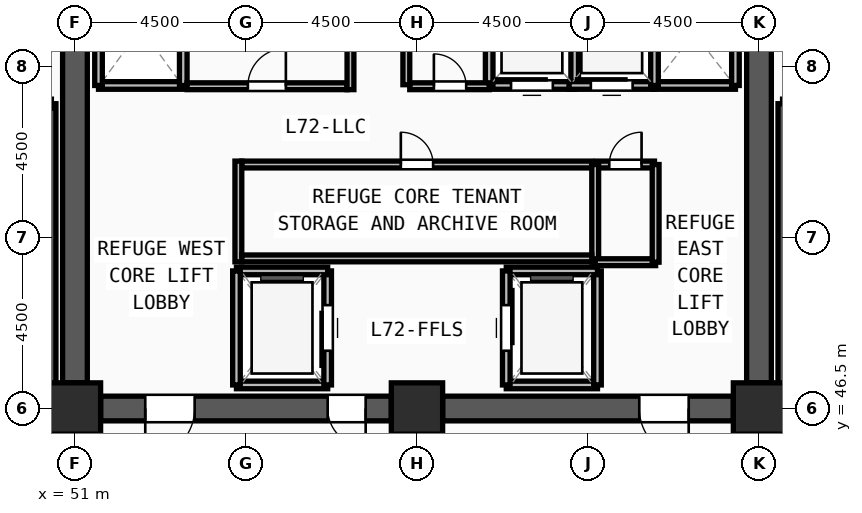
"""IFC4 building model, lengths in metres.
Left out: names, types, materials, properties, quantities, classifications, styles, units other than length and angle.
Written with IfcOpenShell. Run it as: python <this file> out.ifc"""

import sys

from ifc_helpers import new_model, si_unit, direction, frame, frame_2d, origin, origin_2d, place, context, subcontext, project, spatial, rectangle, extrude, source, transform, mapped, element, fill, save


model = new_model("IFC4")
c1 = context("Model", 3, precision=1e-05, world=origin(), true_north=direction((0.0, 1.0)))
c2 = subcontext(c1, "Body", "Model", "MODEL_VIEW")
j1 = project(units=[si_unit("LENGTHUNIT", "METRE"), si_unit("PLANEANGLEUNIT", "RADIAN")], contexts=[c1])
p1 = place(None, origin())
s1 = spatial("IfcSite", under=j1, at=p1, CompositionType="ELEMENT")
p2 = place(p1, origin())
s2 = spatial("IfcBuilding", under=s1, at=p2, CompositionType="ELEMENT")
p3 = place(p2, frame((0.0, 0.0, 277.5)))
s3 = spatial("IfcBuildingStorey", under=s2, at=p3, CompositionType="ELEMENT", Elevation=277.5)
m1 = source(origin(), c2, "Body", "SweptSolid", [
    extrude(rectangle(XDim=1.35, YDim=1.35, at=origin_2d()), origin(), (0.0, 0.0, 1.0), 4.5),
])
for number, where, z_axis, x_axis in (
    (1, (51.0, 46.5, 0.0), (0.0, 0.0, 1.0), (1.0, 0.0, 0.0)),
    (2, (60.0, 46.5, 0.0), (0.0, 0.0, 1.0), (1.0, 0.0, 0.0)),
    (3, (69.0, 46.5, 0.0), (0.0, 0.0, 1.0), (1.0, 0.0, 0.0)),
):
    element("IfcColumn", number, at=place(p3, frame(where, z_axis=z_axis, x_axis=x_axis)), inside=s3, PredefinedType="COLUMN", context=c2, shape_type="MappedRepresentation", body=[
        mapped(m1, transform((0.0, 0.0, 0.0), x_axis=(1.0, 0.0, 0.0), y_axis=(0.0, 1.0, 0.0), z_axis=(0.0, 0.0, 1.0), scale=1.0)),
    ])
p4 = place(p3, frame((69.0, 60.825, 0.0), z_axis=(0.0, 0.0, 1.0), x_axis=(0.0, -1.0, 0.0)))
e4 = element("IfcWall", 4, at=p4, inside=s3, PredefinedType="SHEAR", context=c2, shape_type="SweptSolid", body=[
    extrude(rectangle(XDim=13.65, YDim=0.65, at=frame_2d((6.825, 0.0))), origin(), (0.0, 0.0, 1.0), 4.22),
])
m2 = source(origin(), c2, "Body", "SweptSolid", [
    extrude(rectangle(XDim=1.2, YDim=2.2, at=frame_2d((0.6, 1.1))), frame((0.0, 0.335, 0.0), z_axis=(0.0, -1.0, 0.0), x_axis=(1.0, 0.0, 0.0)), (0.0, 0.0, 1.0), 0.67),
])
p5 = place(p4, frame((1.275, 0.0, 0.0)))
e5 = element("IfcOpeningElement", 5, at=p5, cuts=e4, PredefinedType="OPENING", context=c2, shape_type="MappedRepresentation", body=[
    mapped(m2, transform((0.0, 0.0, 0.0), x_axis=(1.0, 0.0, 0.0), y_axis=(0.0, 1.0, 0.0), z_axis=(0.0, 0.0, 1.0), scale=1.0)),
])
p6 = place(p3, frame((68.325, 46.5, 0.0), z_axis=(0.0, 0.0, 1.0), x_axis=(-1.0, 0.0, 0.0)))
e6 = element("IfcWall", 6, at=p6, inside=s3, PredefinedType="SHEAR", context=c2, shape_type="SweptSolid", body=[
    extrude(rectangle(XDim=7.65, YDim=0.65, at=frame_2d((3.825, 0.0))), origin(), (0.0, 0.0, 1.0), 4.22),
])
m3 = source(origin(), c2, "Body", "SweptSolid", [
    extrude(rectangle(XDim=1.3, YDim=2.2, at=frame_2d((0.65, 1.1))), frame((0.0, 0.335, 0.0), z_axis=(0.0, -1.0, 0.0), x_axis=(1.0, 0.0, 0.0)), (0.0, 0.0, 1.0), 0.67),
])
p7 = place(p6, frame((1.175, 0.0, 0.0)))
e7 = element("IfcOpeningElement", 7, at=p7, cuts=e6, PredefinedType="OPENING", context=c2, shape_type="MappedRepresentation", body=[
    mapped(m3, transform((0.0, 0.0, 0.0), x_axis=(1.0, 0.0, 0.0), y_axis=(0.0, 1.0, 0.0), z_axis=(0.0, 0.0, 1.0), scale=1.0)),
])
p8 = place(p3, frame((59.325, 46.5, 0.0), z_axis=(0.0, 0.0, 1.0), x_axis=(-1.0, 0.0, 0.0)))
e8 = element("IfcWall", 8, at=p8, inside=s3, PredefinedType="SHEAR", context=c2, shape_type="SweptSolid", body=[
    extrude(rectangle(XDim=7.65, YDim=0.65, at=frame_2d((3.825, 0.0))), origin(), (0.0, 0.0, 1.0), 4.22),
])
p9 = place(p8, frame((5.175, 0.0, 0.0)))
e9 = element("IfcOpeningElement", 9, at=p9, cuts=e8, PredefinedType="OPENING", context=c2, shape_type="MappedRepresentation", body=[
    mapped(m3, transform((0.0, 0.0, 0.0), x_axis=(1.0, 0.0, 0.0), y_axis=(0.0, 1.0, 0.0), z_axis=(0.0, 0.0, 1.0), scale=1.0)),
])
m4 = source(origin(), c2, "Body", "SweptSolid", [
    extrude(rectangle(XDim=1.0, YDim=2.2, at=frame_2d((0.5, 1.1))), frame((0.0, 0.335, 0.0), z_axis=(0.0, -1.0, 0.0), x_axis=(1.0, 0.0, 0.0)), (0.0, 0.0, 1.0), 0.67),
])
p10 = place(p8, frame((0.675, 0.0, 0.0)))
e10 = element("IfcOpeningElement", 10, at=p10, cuts=e8, PredefinedType="OPENING", context=c2, shape_type="MappedRepresentation", body=[
    mapped(m4, transform((0.0, 0.0, 0.0), x_axis=(1.0, 0.0, 0.0), y_axis=(0.0, 1.0, 0.0), z_axis=(0.0, 0.0, 1.0), scale=1.0)),
])
p11 = place(p3, frame((51.0, 47.175, 0.0), z_axis=(0.0, 0.0, 1.0), x_axis=(0.0, 1.0, 0.0)))
e11 = element("IfcWall", 11, at=p11, inside=s3, PredefinedType="SHEAR", context=c2, shape_type="SweptSolid", body=[
    extrude(rectangle(XDim=13.65, YDim=0.65, at=frame_2d((6.825, 0.0))), origin(), (0.0, 0.0, 1.0), 4.22),
])
for number, where, z_axis, x_axis in (
    (12, (50.38, 46.7, 0.0), (0.0, 0.0, 1.0), (0.0, 1.0, 0.0)),
    (13, (69.62, 54.52, 0.0), (0.0, 0.0, 1.0), (0.0, -1.0, 0.0)),
):
    element("IfcWall", number, at=place(p3, frame(where, z_axis=z_axis, x_axis=x_axis)), inside=s3, PredefinedType="SOLIDWALL", context=c2, shape_type="SweptSolid", body=[
        extrude(rectangle(XDim=7.82, YDim=0.24, at=frame_2d((3.91, 0.0))), origin(), (0.0, 0.0, 1.0), 4.22),
    ])
p12 = place(p3, frame((55.25, 47.12, 0.0), z_axis=(0.0, 0.0, 1.0), x_axis=(1.0, 0.0, 0.0)))
e14 = element("IfcWall", 14, at=p12, inside=s3, PredefinedType="SOLIDWALL", context=c2, shape_type="SweptSolid", body=[
    extrude(rectangle(XDim=2.4, YDim=0.2, at=frame_2d((1.2, 0.0))), origin(), (0.0, 0.0, 1.0), 4.22),
])
p13 = place(p3, frame((57.65, 47.12, 0.0), z_axis=(0.0, 0.0, 1.0), x_axis=(0.0, 1.0, 0.0)))
e15 = element("IfcWall", 15, at=p13, inside=s3, PredefinedType="SOLIDWALL", context=c2, shape_type="SweptSolid", body=[
    extrude(rectangle(XDim=3.0, YDim=0.2, at=frame_2d((1.5, 0.0))), origin(), (0.0, 0.0, 1.0), 4.22),
])
m5 = source(origin(), c2, "Body", "SweptSolid", [
    extrude(rectangle(XDim=1.2, YDim=2.3, at=frame_2d((0.6, 1.15))), frame((0.0, 0.11, 0.0), z_axis=(0.0, -1.0, 0.0), x_axis=(1.0, 0.0, 0.0)), (0.0, 0.0, 1.0), 0.22),
])
p14 = place(p13, frame((0.9, 0.0, 0.0)))
e16 = element("IfcOpeningElement", 16, at=p14, cuts=e15, PredefinedType="OPENING", context=c2, shape_type="MappedRepresentation", body=[
    mapped(m5, transform((0.0, 0.0, 0.0), x_axis=(1.0, 0.0, 0.0), y_axis=(0.0, 1.0, 0.0), z_axis=(0.0, 0.0, 1.0), scale=1.0)),
])
p15 = place(p3, frame((57.65, 50.12, 0.0), z_axis=(0.0, 0.0, 1.0), x_axis=(-1.0, 0.0, 0.0)))
e17 = element("IfcWall", 17, at=p15, inside=s3, PredefinedType="SOLIDWALL", context=c2, shape_type="SweptSolid", body=[
    extrude(rectangle(XDim=2.4, YDim=0.2, at=frame_2d((1.2, 0.0))), origin(), (0.0, 0.0, 1.0), 4.22),
])
p16 = place(p3, frame((55.25, 50.12, 0.0), z_axis=(0.0, 0.0, 1.0), x_axis=(0.0, -1.0, 0.0)))
e18 = element("IfcWall", 18, at=p16, inside=s3, PredefinedType="SOLIDWALL", context=c2, shape_type="SweptSolid", body=[
    extrude(rectangle(XDim=3.0, YDim=0.2, at=frame_2d((1.5, 0.0))), origin(), (0.0, 0.0, 1.0), 4.22),
])
p17 = place(p3, frame((62.35, 47.12, 0.0), z_axis=(0.0, 0.0, 1.0), x_axis=(1.0, 0.0, 0.0)))
e19 = element("IfcWall", 19, at=p17, inside=s3, PredefinedType="SOLIDWALL", context=c2, shape_type="SweptSolid", body=[
    extrude(rectangle(XDim=2.4, YDim=0.2, at=frame_2d((1.2, 0.0))), origin(), (0.0, 0.0, 1.0), 4.22),
])
p18 = place(p3, frame((64.75, 47.12, 0.0), z_axis=(0.0, 0.0, 1.0), x_axis=(0.0, 1.0, 0.0)))
e20 = element("IfcWall", 20, at=p18, inside=s3, PredefinedType="SOLIDWALL", context=c2, shape_type="SweptSolid", body=[
    extrude(rectangle(XDim=3.0, YDim=0.2, at=frame_2d((1.5, 0.0))), origin(), (0.0, 0.0, 1.0), 4.22),
])
p19 = place(p3, frame((64.75, 50.12, 0.0), z_axis=(0.0, 0.0, 1.0), x_axis=(-1.0, 0.0, 0.0)))
e21 = element("IfcWall", 21, at=p19, inside=s3, PredefinedType="SOLIDWALL", context=c2, shape_type="SweptSolid", body=[
    extrude(rectangle(XDim=2.4, YDim=0.2, at=frame_2d((1.2, 0.0))), origin(), (0.0, 0.0, 1.0), 4.22),
])
p20 = place(p3, frame((62.35, 50.12, 0.0), z_axis=(0.0, 0.0, 1.0), x_axis=(0.0, -1.0, 0.0)))
e22 = element("IfcWall", 22, at=p20, inside=s3, PredefinedType="SOLIDWALL", context=c2, shape_type="SweptSolid", body=[
    extrude(rectangle(XDim=3.0, YDim=0.2, at=frame_2d((1.5, 0.0))), origin(), (0.0, 0.0, 1.0), 4.22),
])
p21 = place(p20, frame((0.9, 0.0, 0.0)))
e23 = element("IfcOpeningElement", 23, at=p21, cuts=e22, PredefinedType="OPENING", context=c2, shape_type="MappedRepresentation", body=[
    mapped(m5, transform((0.0, 0.0, 0.0), x_axis=(1.0, 0.0, 0.0), y_axis=(0.0, 1.0, 0.0), z_axis=(0.0, 0.0, 1.0), scale=1.0)),
])
p22 = place(p3, frame((51.62, 55.0, 0.0), z_axis=(0.0, 0.0, 1.0), x_axis=(1.0, 0.0, 0.0)))
e24 = element("IfcWall", 24, at=p22, inside=s3, PredefinedType="SOLIDWALL", context=c2, shape_type="SweptSolid", body=[
    extrude(rectangle(XDim=2.23, YDim=0.2, at=frame_2d((1.115, 0.0))), origin(), (0.0, 0.0, 1.0), 4.22),
])
for number, where, z_axis, x_axis in (
    (25, (53.85, 55.0, 0.0), (0.0, 0.0, 1.0), (0.0, 1.0, 0.0)),
    (26, (51.62, 58.0, 0.0), (0.0, 0.0, 1.0), (0.0, -1.0, 0.0)),
):
    element("IfcWall", number, at=place(p3, frame(where, z_axis=z_axis, x_axis=x_axis)), inside=s3, PredefinedType="SOLIDWALL", context=c2, shape_type="SweptSolid", body=[
        extrude(rectangle(XDim=3.0, YDim=0.2, at=frame_2d((1.5, 0.0))), origin(), (0.0, 0.0, 1.0), 4.22),
    ])
p23 = place(p3, frame((66.2, 55.0, 0.0), z_axis=(0.0, 0.0, 1.0), x_axis=(1.0, 0.0, 0.0)))
e27 = element("IfcWall", 27, at=p23, inside=s3, PredefinedType="SOLIDWALL", context=c2, shape_type="SweptSolid", body=[
    extrude(rectangle(XDim=2.18, YDim=0.2, at=frame_2d((1.09, 0.0))), origin(), (0.0, 0.0, 1.0), 4.22),
])
p24 = place(p3, frame((68.38, 55.0, 0.0), z_axis=(0.0, 0.0, 1.0), x_axis=(0.0, 1.0, 0.0)))
e28 = element("IfcWall", 28, at=p24, inside=s3, PredefinedType="SOLIDWALL", context=c2, shape_type="SweptSolid", body=[
    extrude(rectangle(XDim=2.75, YDim=0.2, at=frame_2d((1.375, 0.0))), origin(), (0.0, 0.0, 1.0), 4.22),
])
p25 = place(p3, frame((61.9, 55.0, 0.0), z_axis=(0.0, 0.0, 1.0), x_axis=(1.0, 0.0, 0.0)))
e29 = element("IfcWall", 29, at=p25, inside=s3, PredefinedType="SOLIDWALL", context=c2, shape_type="SweptSolid", body=[
    extrude(rectangle(XDim=2.25, YDim=0.2, at=frame_2d((1.125, 0.0))), origin(), (0.0, 0.0, 1.0), 4.22),
])
m6 = source(origin(), c2, "Body", "SweptSolid", [
    extrude(rectangle(XDim=1.1, YDim=2.2, at=frame_2d((0.55, 1.1))), frame((0.0, 0.11, 0.0), z_axis=(0.0, -1.0, 0.0), x_axis=(1.0, 0.0, 0.0)), (0.0, 0.0, 1.0), 0.22),
])
p26 = place(p25, frame((0.575, 0.0, 0.0)))
e30 = element("IfcOpeningElement", 30, at=p26, cuts=e29, PredefinedType="OPENING", context=c2, shape_type="MappedRepresentation", body=[
    mapped(m6, transform((0.0, 0.0, 0.0), x_axis=(1.0, 0.0, 0.0), y_axis=(0.0, 1.0, 0.0), z_axis=(0.0, 0.0, 1.0), scale=1.0)),
])
for number, where, z_axis, x_axis in (
    (31, (64.15, 55.0, 0.0), (0.0, 0.0, 1.0), (0.0, 1.0, 0.0)),
    (32, (61.9, 57.6, 0.0), (0.0, 0.0, 1.0), (0.0, -1.0, 0.0)),
):
    element("IfcWall", number, at=place(p3, frame(where, z_axis=z_axis, x_axis=x_axis)), inside=s3, PredefinedType="SOLIDWALL", context=c2, shape_type="SweptSolid", body=[
        extrude(rectangle(XDim=2.6, YDim=0.2, at=frame_2d((1.3, 0.0))), origin(), (0.0, 0.0, 1.0), 4.22),
    ])
p27 = place(p3, frame((64.0, 55.0, 0.0), z_axis=(0.0, 0.0, 1.0), x_axis=(1.0, 0.0, 0.0)))
e33 = element("IfcWall", 33, at=p27, inside=s3, PredefinedType="SOLIDWALL", context=c2, shape_type="SweptSolid", body=[
    extrude(rectangle(XDim=2.25, YDim=0.2, at=frame_2d((1.125, 0.0))), origin(), (0.0, 0.0, 1.0), 4.22),
])
p28 = place(p27, frame((0.575, 0.0, 0.0)))
e34 = element("IfcOpeningElement", 34, at=p28, cuts=e33, PredefinedType="OPENING", context=c2, shape_type="MappedRepresentation", body=[
    mapped(m6, transform((0.0, 0.0, 0.0), x_axis=(1.0, 0.0, 0.0), y_axis=(0.0, 1.0, 0.0), z_axis=(0.0, 0.0, 1.0), scale=1.0)),
])
p29 = place(p3, frame((66.25, 55.0, 0.0), z_axis=(0.0, 0.0, 1.0), x_axis=(0.0, 1.0, 0.0)))
e35 = element("IfcWall", 35, at=p29, inside=s3, PredefinedType="SOLIDWALL", context=c2, shape_type="SweptSolid", body=[
    extrude(rectangle(XDim=2.6, YDim=0.2, at=frame_2d((1.3, 0.0))), origin(), (0.0, 0.0, 1.0), 4.22),
])
p30 = place(p3, frame((55.39, 52.92, 0.0), z_axis=(0.0, 0.0, 1.0), x_axis=(1.0, 0.0, 0.0)))
e36 = element("IfcWall", 36, at=p30, inside=s3, PredefinedType="PARTITIONING", context=c2, shape_type="SweptSolid", body=[
    extrude(rectangle(XDim=9.21, YDim=0.18, at=frame_2d((4.605, 0.0))), origin(), (0.0, 0.0, 1.0), 4.22),
])
m7 = source(origin(), c2, "Body", "SweptSolid", [
    extrude(rectangle(XDim=0.85, YDim=2.1, at=frame_2d((0.425, 1.05))), frame((0.0, 0.1, 0.0), z_axis=(0.0, -1.0, 0.0), x_axis=(1.0, 0.0, 0.0)), (0.0, 0.0, 1.0), 0.2),
])
p31 = place(p30, frame((4.185, 0.0, 0.0)))
e37 = element("IfcOpeningElement", 37, at=p31, cuts=e36, PredefinedType="OPENING", context=c2, shape_type="MappedRepresentation", body=[
    mapped(m7, transform((0.0, 0.0, 0.0), x_axis=(1.0, 0.0, 0.0), y_axis=(0.0, 1.0, 0.0), z_axis=(0.0, 0.0, 1.0), scale=1.0)),
])
p32 = place(p3, frame((53.95, 54.98, 0.0), z_axis=(0.0, 0.0, 1.0), x_axis=(1.0, 0.0, 0.0)))
e38 = element("IfcWall", 38, at=p32, inside=s3, PredefinedType="PARTITIONING", context=c2, shape_type="SweptSolid", body=[
    extrude(rectangle(XDim=4.21, YDim=0.18, at=frame_2d((2.105, 0.0))), origin(), (0.0, 0.0, 1.0), 4.22),
])
m8 = source(origin(), c2, "Body", "SweptSolid", [
    extrude(rectangle(XDim=1.0, YDim=2.2, at=frame_2d((0.5, 1.1))), frame((0.0, 0.1, 0.0), z_axis=(0.0, -1.0, 0.0), x_axis=(1.0, 0.0, 0.0)), (0.0, 0.0, 1.0), 0.2),
])
p33 = place(p32, frame((1.6, 0.0, 0.0)))
e39 = element("IfcOpeningElement", 39, at=p33, cuts=e38, PredefinedType="OPENING", context=c2, shape_type="MappedRepresentation", body=[
    mapped(m8, transform((0.0, 0.0, 0.0), x_axis=(1.0, 0.0, 0.0), y_axis=(0.0, 1.0, 0.0), z_axis=(0.0, 0.0, 1.0), scale=1.0)),
])
p34 = place(p3, frame((59.81, 54.98, 0.0), z_axis=(0.0, 0.0, 1.0), x_axis=(1.0, 0.0, 0.0)))
e40 = element("IfcWall", 40, at=p34, inside=s3, PredefinedType="PARTITIONING", context=c2, shape_type="SweptSolid", body=[
    extrude(rectangle(XDim=2.09, YDim=0.18, at=frame_2d((1.045, 0.0))), origin(), (0.0, 0.0, 1.0), 4.22),
])
p35 = place(p34, frame((0.635, 0.0, 0.0)))
e41 = element("IfcOpeningElement", 41, at=p35, cuts=e40, PredefinedType="OPENING", context=c2, shape_type="MappedRepresentation", body=[
    mapped(m7, transform((0.0, 0.0, 0.0), x_axis=(1.0, 0.0, 0.0), y_axis=(0.0, 1.0, 0.0), z_axis=(0.0, 0.0, 1.0), scale=1.0)),
])
p36 = place(p3, frame((64.72, 52.92, 0.0), z_axis=(0.0, 0.0, 1.0), x_axis=(1.0, 0.0, 0.0)))
e42 = element("IfcWall", 42, at=p36, inside=s3, PredefinedType="PARTITIONING", context=c2, shape_type="SweptSolid", body=[
    extrude(rectangle(XDim=1.53, YDim=0.18, at=frame_2d((0.765, 0.0))), origin(), (0.0, 0.0, 1.0), 4.22),
])
p37 = place(p36, frame((0.34, 0.0, 0.0)))
e43 = element("IfcOpeningElement", 43, at=p37, cuts=e42, PredefinedType="OPENING", context=c2, shape_type="MappedRepresentation", body=[
    mapped(m7, transform((0.0, 0.0, 0.0), x_axis=(1.0, 0.0, 0.0), y_axis=(0.0, 1.0, 0.0), z_axis=(0.0, 0.0, 1.0), scale=1.0)),
])
p38 = place(p3, frame((59.72, 55.02, 0.0), z_axis=(0.0, 0.0, 1.0), x_axis=(0.0, 1.0, 0.0)))
e44 = element("IfcWall", 44, at=p38, inside=s3, PredefinedType="PARTITIONING", context=c2, shape_type="SweptSolid", body=[
    extrude(rectangle(XDim=1.73, YDim=0.18, at=frame_2d((0.865, 0.0))), origin(), (0.0, 0.0, 1.0), 4.22),
])
p39 = place(p3, frame((64.69, 50.35, 0.0), z_axis=(0.0, 0.0, 1.0), x_axis=(0.0, 1.0, 0.0)))
e45 = element("IfcWall", 45, at=p39, inside=s3, PredefinedType="PARTITIONING", context=c2, shape_type="SweptSolid", body=[
    extrude(rectangle(XDim=2.57, YDim=0.18, at=frame_2d((1.285, 0.0))), origin(), (0.0, 0.0, 1.0), 4.22),
])
p40 = place(p3, frame((64.69, 50.35, 0.0), z_axis=(0.0, 0.0, 1.0), x_axis=(1.0, 0.0, 0.0)))
e46 = element("IfcWall", 46, at=p40, inside=s3, PredefinedType="PARTITIONING", context=c2, shape_type="SweptSolid", body=[
    extrude(rectangle(XDim=1.59, YDim=0.18, at=frame_2d((0.795, 0.0))), origin(), (0.0, 0.0, 1.0), 4.22),
])
p41 = place(p3, frame((66.28, 50.35, 0.0), z_axis=(0.0, 0.0, 1.0), x_axis=(0.0, 1.0, 0.0)))
e47 = element("IfcWall", 47, at=p41, inside=s3, PredefinedType="PARTITIONING", context=c2, shape_type="SweptSolid", body=[
    extrude(rectangle(XDim=2.57, YDim=0.18, at=frame_2d((1.285, 0.0))), origin(), (0.0, 0.0, 1.0), 4.22),
])
p42 = place(p3, frame((55.3, 50.36, 0.0), z_axis=(0.0, 0.0, 1.0), x_axis=(0.0, 1.0, 0.0)))
e48 = element("IfcWall", 48, at=p42, inside=s3, PredefinedType="PARTITIONING", context=c2, shape_type="SweptSolid", body=[
    extrude(rectangle(XDim=2.65, YDim=0.18, at=frame_2d((1.325, 0.0))), origin(), (0.0, 0.0, 1.0), 4.22),
])
p43 = place(p3, frame((55.39, 50.45, 0.0), z_axis=(0.0, 0.0, 1.0), x_axis=(1.0, 0.0, 0.0)))
e49 = element("IfcWall", 49, at=p43, inside=s3, PredefinedType="PARTITIONING", context=c2, shape_type="SweptSolid", body=[
    extrude(rectangle(XDim=9.21, YDim=0.18, at=frame_2d((4.605, 0.0))), origin(), (0.0, 0.0, 1.0), 4.22),
])
p44 = place(p3, frame((58.25, 54.89, 0.0), z_axis=(0.0, 0.0, 1.0), x_axis=(0.0, 1.0, 0.0)))
e50 = element("IfcWall", 50, at=p44, inside=s3, PredefinedType="PARTITIONING", context=c2, shape_type="SweptSolid", body=[
    extrude(rectangle(XDim=2.78, YDim=0.18, at=frame_2d((1.39, 0.0))), origin(), (0.0, 0.0, 1.0), 4.22),
])
m9 = source(origin(), c2, "Body", "SweptSolid", [
    extrude(rectangle(XDim=1.3, YDim=2.2, at=frame_2d((0.65, 1.1))), frame((0.0, 0.025, 0.0), z_axis=(0.0, -1.0, 0.0), x_axis=(1.0, 0.0, 0.0)), (0.0, 0.0, 1.0), 0.05),
])
p45 = place(p9, origin())
e51 = element("IfcDoor", 51, at=p45, inside=s3, OperationType="SINGLE_SWING_RIGHT", PredefinedType="DOOR", context=c2, shape_type="MappedRepresentation", body=[
    mapped(m9, transform((0.0, 0.0, 0.0), x_axis=(1.0, 0.0, 0.0), y_axis=(0.0, 1.0, 0.0), z_axis=(0.0, 0.0, 1.0), scale=1.0)),
])
fill(e9, e51)
m10 = source(origin(), c2, "Body", "SweptSolid", [
    extrude(rectangle(XDim=1.0, YDim=2.2, at=frame_2d((0.5, 1.1))), frame((0.0, 0.025, 0.0), z_axis=(0.0, -1.0, 0.0), x_axis=(1.0, 0.0, 0.0)), (0.0, 0.0, 1.0), 0.05),
])
p46 = place(p10, origin())
e52 = element("IfcDoor", 52, at=p46, inside=s3, OperationType="SINGLE_SWING_LEFT", PredefinedType="DOOR", context=c2, shape_type="MappedRepresentation", body=[
    mapped(m10, transform((0.0, 0.0, 0.0), x_axis=(1.0, 0.0, 0.0), y_axis=(0.0, 1.0, 0.0), z_axis=(0.0, 0.0, 1.0), scale=1.0)),
])
fill(e10, e52)
p47 = place(p7, origin())
e53 = element("IfcDoor", 53, at=p47, inside=s3, OperationType="SINGLE_SWING_LEFT", PredefinedType="DOOR", context=c2, shape_type="MappedRepresentation", body=[
    mapped(m9, transform((0.0, 0.0, 0.0), x_axis=(1.0, 0.0, 0.0), y_axis=(0.0, 1.0, 0.0), z_axis=(0.0, 0.0, 1.0), scale=1.0)),
])
fill(e7, e53)
m11 = source(origin(), c2, "Body", "SweptSolid", [
    extrude(rectangle(XDim=1.2, YDim=2.3, at=frame_2d((0.6, 1.15))), frame((0.0, 0.025, 0.0), z_axis=(0.0, -1.0, 0.0), x_axis=(1.0, 0.0, 0.0)), (0.0, 0.0, 1.0), 0.05),
])
p48 = place(p14, origin())
e54 = element("IfcDoor", 54, at=p48, inside=s3, OperationType="SLIDING_TO_LEFT", PredefinedType="DOOR", context=c2, shape_type="MappedRepresentation", body=[
    mapped(m11, transform((0.0, 0.0, 0.0), x_axis=(1.0, 0.0, 0.0), y_axis=(0.0, 1.0, 0.0), z_axis=(0.0, 0.0, 1.0), scale=1.0)),
])
fill(e16, e54)
p49 = place(p21, origin())
e55 = element("IfcDoor", 55, at=p49, inside=s3, OperationType="SLIDING_TO_LEFT", PredefinedType="DOOR", context=c2, shape_type="MappedRepresentation", body=[
    mapped(m11, transform((0.0, 0.0, 0.0), x_axis=(1.0, 0.0, 0.0), y_axis=(0.0, 1.0, 0.0), z_axis=(0.0, 0.0, 1.0), scale=1.0)),
])
fill(e23, e55)
m12 = source(origin(), c2, "Body", "SweptSolid", [
    extrude(rectangle(XDim=1.1, YDim=2.2, at=frame_2d((0.55, 1.1))), frame((0.0, 0.025, 0.0), z_axis=(0.0, -1.0, 0.0), x_axis=(1.0, 0.0, 0.0)), (0.0, 0.0, 1.0), 0.05),
])
p50 = place(p26, origin())
e56 = element("IfcDoor", 56, at=p50, inside=s3, OperationType="SLIDING_TO_LEFT", PredefinedType="DOOR", context=c2, shape_type="MappedRepresentation", body=[
    mapped(m12, transform((0.0, 0.0, 0.0), x_axis=(1.0, 0.0, 0.0), y_axis=(0.0, 1.0, 0.0), z_axis=(0.0, 0.0, 1.0), scale=1.0)),
])
fill(e30, e56)
p51 = place(p28, origin())
e57 = element("IfcDoor", 57, at=p51, inside=s3, OperationType="SLIDING_TO_LEFT", PredefinedType="DOOR", context=c2, shape_type="MappedRepresentation", body=[
    mapped(m12, transform((0.0, 0.0, 0.0), x_axis=(1.0, 0.0, 0.0), y_axis=(0.0, 1.0, 0.0), z_axis=(0.0, 0.0, 1.0), scale=1.0)),
])
fill(e34, e57)
m13 = source(origin(), c2, "Body", "SweptSolid", [
    extrude(rectangle(XDim=0.85, YDim=2.1, at=frame_2d((0.425, 1.05))), frame((0.0, 0.025, 0.0), z_axis=(0.0, -1.0, 0.0), x_axis=(1.0, 0.0, 0.0)), (0.0, 0.0, 1.0), 0.05),
])
p52 = place(p31, origin())
e58 = element("IfcDoor", 58, at=p52, inside=s3, OperationType="SINGLE_SWING_LEFT", PredefinedType="DOOR", context=c2, shape_type="MappedRepresentation", body=[
    mapped(m13, transform((0.0, 0.0, 0.0), x_axis=(1.0, 0.0, 0.0), y_axis=(0.0, 1.0, 0.0), z_axis=(0.0, 0.0, 1.0), scale=1.0)),
])
fill(e37, e58)
p53 = place(p33, origin())
e59 = element("IfcDoor", 59, at=p53, inside=s3, OperationType="SINGLE_SWING_RIGHT", PredefinedType="DOOR", context=c2, shape_type="MappedRepresentation", body=[
    mapped(m10, transform((0.0, 0.0, 0.0), x_axis=(1.0, 0.0, 0.0), y_axis=(0.0, 1.0, 0.0), z_axis=(0.0, 0.0, 1.0), scale=1.0)),
])
fill(e39, e59)
p54 = place(p35, origin())
e60 = element("IfcDoor", 60, at=p54, inside=s3, OperationType="SINGLE_SWING_LEFT", PredefinedType="DOOR", context=c2, shape_type="MappedRepresentation", body=[
    mapped(m13, transform((0.0, 0.0, 0.0), x_axis=(1.0, 0.0, 0.0), y_axis=(0.0, 1.0, 0.0), z_axis=(0.0, 0.0, 1.0), scale=1.0)),
])
fill(e41, e60)
p55 = place(p37, origin())
e61 = element("IfcDoor", 61, at=p55, inside=s3, OperationType="SINGLE_SWING_RIGHT", PredefinedType="DOOR", context=c2, shape_type="MappedRepresentation", body=[
    mapped(m13, transform((0.0, 0.0, 0.0), x_axis=(1.0, 0.0, 0.0), y_axis=(0.0, 1.0, 0.0), z_axis=(0.0, 0.0, 1.0), scale=1.0)),
])
fill(e43, e61)
save(model, sys.argv[1])
